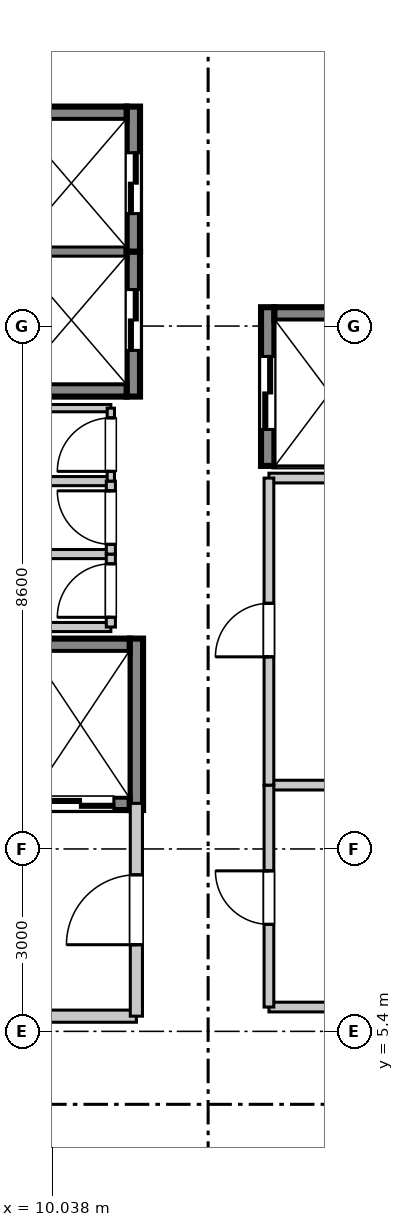
"""IFC4 building model, lengths in metres.
Left out: names, types, materials, properties, quantities, classifications, styles, units other than length and angle.
Written with IfcOpenShell. Run it as: python <this file> out.ifc"""

import sys

from ifc_helpers import new_model, si_unit, direction, frame, frame_2d, origin, place, context, subcontext, project, spatial, rectangle, extrude, source, transform, mapped, element, fill, save


model = new_model("IFC4")
c1 = context("Model", 3, precision=1e-05, world=origin(), true_north=direction((0.0, 1.0)))
c2 = subcontext(c1, "Body", "Model", "MODEL_VIEW")
j1 = project(units=[si_unit("LENGTHUNIT", "METRE"), si_unit("PLANEANGLEUNIT", "RADIAN")], contexts=[c1])
p1 = place(None, origin())
s1 = spatial("IfcSite", under=j1, at=p1, CompositionType="ELEMENT")
p2 = place(p1, origin())
s2 = spatial("IfcBuilding", under=s1, at=p2, CompositionType="ELEMENT")
p3 = place(p2, frame((0.0, 0.0, 352.05)))
s3 = spatial("IfcBuildingStorey", under=s2, at=p3, CompositionType="ELEMENT", Elevation=352.05)
m1 = source(origin(), c2, "Body", "SweptSolid", [
    extrude(rectangle(XDim=2.385, YDim=0.22, at=frame_2d((1.192, 0.0))), origin(), (0.0, 0.0, 1.0), 4.7),
])
p4 = place(p3, frame((11.37, 15.84, 0.0), z_axis=(0.0, 0.0, 1.0), x_axis=(0.0, 1.0, 0.0)))
e1 = element("IfcWall", 1, at=p4, inside=s3, PredefinedType="SHEAR", context=c2, shape_type="MappedRepresentation", body=[
    mapped(m1, transform((0.0, 0.0, 0.0), scale=1.0)),
])
p5 = place(p4, frame((0.76, 0.0, 0.0)))
e2 = element("IfcOpeningElement", 2, at=p5, cuts=e1, PredefinedType="OPENING", context=c2, shape_type="SweptSolid", body=[
    extrude(rectangle(XDim=1.0, YDim=2.2, at=frame_2d((0.5, 1.1))), frame((0.0, 0.12, 0.0), z_axis=(0.0, -1.0, 0.0), x_axis=(1.0, 0.0, 0.0)), (0.0, 0.0, 1.0), 0.24),
])
m2 = source(origin(), c2, "Body", "SweptSolid", [
    extrude(rectangle(XDim=1.82, YDim=0.22, at=frame_2d((0.91, 0.0))), origin(), (0.0, 0.0, 1.0), 4.7),
])
p6 = place(p3, frame((9.44, 15.95, 0.0), z_axis=(0.0, 0.0, 1.0), x_axis=(1.0, 0.0, 0.0)))
e3 = element("IfcWall", 3, at=p6, inside=s3, PredefinedType="SHEAR", context=c2, shape_type="MappedRepresentation", body=[
    mapped(m2, transform((0.0, 0.0, 0.0), scale=1.0)),
])
m3 = source(origin(), c2, "Body", "SweptSolid", [
    extrude(rectangle(XDim=1.82, YDim=0.22, at=frame_2d((0.91, 0.0))), origin(), (0.0, 0.0, 1.0), 5.0),
])
p7 = place(p3, frame((9.44, 18.225, 0.0), z_axis=(0.0, 0.0, 1.0), x_axis=(1.0, 0.0, 0.0)))
e4 = element("IfcWall", 4, at=p7, inside=s3, PredefinedType="SHEAR", context=c2, shape_type="MappedRepresentation", body=[
    mapped(m3, transform((0.0, 0.0, 0.0), scale=1.0)),
])
p8 = place(p3, frame((11.37, 18.225, 0.0), z_axis=(0.0, 0.0, 1.0), x_axis=(0.0, 1.0, 0.0)))
e5 = element("IfcWall", 5, at=p8, inside=s3, PredefinedType="SHEAR", context=c2, shape_type="MappedRepresentation", body=[
    mapped(m1, transform((0.0, 0.0, 0.0), scale=1.0)),
])
p9 = place(p8, frame((0.625, 0.0, 0.0)))
e6 = element("IfcOpeningElement", 6, at=p9, cuts=e5, PredefinedType="OPENING", context=c2, shape_type="SweptSolid", body=[
    extrude(rectangle(XDim=1.0, YDim=2.2, at=frame_2d((0.5, 1.1))), frame((0.0, 0.12, 0.0), z_axis=(0.0, -1.0, 0.0), x_axis=(1.0, 0.0, 0.0)), (0.0, 0.0, 1.0), 0.24),
])
p10 = place(p3, frame((9.44, 20.5, 0.0), z_axis=(0.0, 0.0, 1.0), x_axis=(1.0, 0.0, 0.0)))
e7 = element("IfcWall", 7, at=p10, inside=s3, PredefinedType="SHEAR", context=c2, shape_type="MappedRepresentation", body=[
    mapped(m2, transform((0.0, 0.0, 0.0), scale=1.0)),
])
m4 = source(origin(), c2, "Body", "SweptSolid", [
    extrude(rectangle(XDim=2.82, YDim=0.22, at=frame_2d((1.41, 0.0))), origin(), (0.0, 0.0, 1.0), 4.7),
])
p11 = place(p3, frame((11.42, 9.04, 0.0), z_axis=(0.0, 0.0, 1.0), x_axis=(0.0, 1.0, 0.0)))
e8 = element("IfcWall", 8, at=p11, inside=s3, PredefinedType="SHEAR", context=c2, shape_type="MappedRepresentation", body=[
    mapped(m4, transform((0.0, 0.0, 0.0), scale=1.0)),
])
m5 = source(origin(), c2, "Body", "SweptSolid", [
    extrude(rectangle(XDim=1.62, YDim=0.22, at=frame_2d((0.81, 0.0))), origin(), (0.0, 0.0, 1.0), 4.7),
])
p12 = place(p3, frame((9.69, 9.15, 0.0), z_axis=(0.0, 0.0, 1.0), x_axis=(1.0, 0.0, 0.0)))
e9 = element("IfcWall", 9, at=p12, inside=s3, PredefinedType="SHEAR", context=c2, shape_type="MappedRepresentation", body=[
    mapped(m5, transform((0.0, 0.0, 0.0), scale=1.0)),
])
p13 = place(p12, frame((0.26, 0.0, 0.0)))
e10 = element("IfcOpeningElement", 10, at=p13, cuts=e9, PredefinedType="OPENING", context=c2, shape_type="SweptSolid", body=[
    extrude(rectangle(XDim=1.1, YDim=2.2, at=frame_2d((0.55, 1.1))), frame((0.0, 0.12, 0.0), z_axis=(0.0, -1.0, 0.0), x_axis=(1.0, 0.0, 0.0)), (0.0, 0.0, 1.0), 0.24),
])
p14 = place(p3, frame((9.69, 11.75, 0.0), z_axis=(0.0, 0.0, 1.0), x_axis=(1.0, 0.0, 0.0)))
e11 = element("IfcWall", 11, at=p14, inside=s3, PredefinedType="SHEAR", context=c2, shape_type="MappedRepresentation", body=[
    mapped(m5, transform((0.0, 0.0, 0.0), scale=1.0)),
])
m6 = source(origin(), c2, "Body", "SweptSolid", [
    extrude(rectangle(XDim=2.61, YDim=0.22, at=frame_2d((1.305, 0.0))), origin(), (0.0, 0.0, 1.0), 4.7),
])
p15 = place(p3, frame((13.58, 14.7, 0.0), z_axis=(0.0, 0.0, 1.0), x_axis=(0.0, 1.0, 0.0)))
e12 = element("IfcWall", 12, at=p15, inside=s3, PredefinedType="SHEAR", context=c2, shape_type="MappedRepresentation", body=[
    mapped(m6, transform((0.0, 0.0, 0.0), scale=1.0)),
])
p16 = place(p15, frame((0.6, 0.0, 0.0)))
e13 = element("IfcOpeningElement", 13, at=p16, cuts=e12, PredefinedType="OPENING", context=c2, shape_type="SweptSolid", body=[
    extrude(rectangle(XDim=1.2, YDim=2.2, at=frame_2d((0.6, 1.1))), frame((0.0, 0.12, 0.0), z_axis=(0.0, -1.0, 0.0), x_axis=(1.0, 0.0, 0.0)), (0.0, 0.0, 1.0), 0.24),
])
p17 = place(p3, frame((13.69, 17.2, 0.0), z_axis=(0.0, 0.0, 1.0), x_axis=(1.0, 0.0, 0.0)))
e14 = element("IfcWall", 14, at=p17, inside=s3, PredefinedType="SHEAR", context=c2, shape_type="MappedRepresentation", body=[
    mapped(m2, transform((0.0, 0.0, 0.0), scale=1.0)),
])
m7 = source(origin(), c2, "Body", "SweptSolid", [
    extrude(rectangle(XDim=3.82, YDim=0.2, at=frame_2d((1.91, 0.0))), origin(), (0.0, 0.0, 1.0), 3.4),
])
p18 = place(p3, frame((7.6, 5.65, 0.0), z_axis=(0.0, 0.0, 1.0), x_axis=(1.0, 0.0, 0.0)))
e15 = element("IfcWall", 15, at=p18, inside=s3, PredefinedType="PARTITIONING", context=c2, shape_type="MappedRepresentation", body=[
    mapped(m7, transform((0.0, 0.0, 0.0), scale=1.0)),
])
m8 = source(origin(), c2, "Body", "SweptSolid", [
    extrude(rectangle(XDim=3.5, YDim=0.2, at=frame_2d((1.75, 0.0))), origin(), (0.0, 0.0, 1.0), 3.4),
])
p19 = place(p3, frame((11.42, 5.65, 0.0), z_axis=(0.0, 0.0, 1.0), x_axis=(0.0, 1.0, 0.0)))
e16 = element("IfcWall", 16, at=p19, inside=s3, PredefinedType="PARTITIONING", context=c2, shape_type="MappedRepresentation", body=[
    mapped(m8, transform((0.0, 0.0, 0.0), scale=1.0)),
])
p20 = place(p19, frame((1.175, 0.0, 0.0)))
e17 = element("IfcOpeningElement", 17, at=p20, cuts=e16, PredefinedType="OPENING", context=c2, shape_type="SweptSolid", body=[
    extrude(rectangle(XDim=1.15, YDim=2.15, at=frame_2d((0.575, 1.075))), frame((0.0, 0.11, 0.0), z_axis=(0.0, -1.0, 0.0), x_axis=(1.0, 0.0, 0.0)), (0.0, 0.0, 1.0), 0.22),
])
m9 = source(origin(), c2, "Body", "SweptSolid", [
    extrude(rectangle(XDim=1.75, YDim=0.15, at=frame_2d((0.875, 0.0))), origin(), (0.0, 0.0, 1.0), 3.4),
])
for number, where, z_axis, x_axis in (
    (18, (9.25, 12.05, 0.0), (0.0, 0.0, 1.0), (1.0, 0.0, 0.0)),
    (19, (9.25, 13.25, 0.0), (0.0, 0.0, 1.0), (1.0, 0.0, 0.0)),
):
    element("IfcWall", number, at=place(p3, frame(where, z_axis=z_axis, x_axis=x_axis)), inside=s3, PredefinedType="PARTITIONING", context=c2, shape_type="MappedRepresentation", body=[
        mapped(m9, transform((0.0, 0.0, 0.0), scale=1.0)),
    ])
m10 = source(origin(), c2, "Body", "SweptSolid", [
    extrude(rectangle(XDim=1.2, YDim=0.15, at=frame_2d((0.6, 0.0))), origin(), (0.0, 0.0, 1.0), 3.4),
])
p21 = place(p3, frame((11.0, 12.05, 0.0), z_axis=(0.0, 0.0, 1.0), x_axis=(0.0, 1.0, 0.0)))
e20 = element("IfcWall", 20, at=p21, inside=s3, PredefinedType="PARTITIONING", context=c2, shape_type="MappedRepresentation", body=[
    mapped(m10, transform((0.0, 0.0, 0.0), scale=1.0)),
])
p22 = place(p21, frame((0.16, 0.0, 0.0)))
e21 = element("IfcOpeningElement", 21, at=p22, cuts=e20, PredefinedType="OPENING", context=c2, shape_type="SweptSolid", body=[
    extrude(rectangle(XDim=0.88, YDim=2.1, at=frame_2d((0.44, 1.05))), frame((0.0, 0.085, 0.0), z_axis=(0.0, -1.0, 0.0), x_axis=(1.0, 0.0, 0.0)), (0.0, 0.0, 1.0), 0.17),
])
p23 = place(p3, frame((9.25, 14.45, 0.0), z_axis=(0.0, 0.0, 1.0), x_axis=(1.0, 0.0, 0.0)))
e22 = element("IfcWall", 22, at=p23, inside=s3, PredefinedType="PARTITIONING", context=c2, shape_type="MappedRepresentation", body=[
    mapped(m9, transform((0.0, 0.0, 0.0), scale=1.0)),
])
p24 = place(p3, frame((11.0, 13.25, 0.0), z_axis=(0.0, 0.0, 1.0), x_axis=(0.0, 1.0, 0.0)))
e23 = element("IfcWall", 23, at=p24, inside=s3, PredefinedType="PARTITIONING", context=c2, shape_type="MappedRepresentation", body=[
    mapped(m10, transform((0.0, 0.0, 0.0), scale=1.0)),
])
p25 = place(p24, frame((0.16, 0.0, 0.0)))
e24 = element("IfcOpeningElement", 24, at=p25, cuts=e23, PredefinedType="OPENING", context=c2, shape_type="SweptSolid", body=[
    extrude(rectangle(XDim=0.88, YDim=2.1, at=frame_2d((0.44, 1.05))), frame((0.0, 0.085, 0.0), z_axis=(0.0, -1.0, 0.0), x_axis=(1.0, 0.0, 0.0)), (0.0, 0.0, 1.0), 0.17),
])
m11 = source(origin(), c2, "Body", "SweptSolid", [
    extrude(rectangle(XDim=1.75, YDim=0.12, at=frame_2d((0.875, 0.0))), origin(), (0.0, 0.0, 1.0), 3.4),
])
p26 = place(p3, frame((9.25, 15.65, 0.0), z_axis=(0.0, 0.0, 1.0), x_axis=(1.0, 0.0, 0.0)))
e25 = element("IfcWall", 25, at=p26, inside=s3, PredefinedType="PARTITIONING", context=c2, shape_type="MappedRepresentation", body=[
    mapped(m11, transform((0.0, 0.0, 0.0), scale=1.0)),
])
m12 = source(origin(), c2, "Body", "SweptSolid", [
    extrude(rectangle(XDim=1.2, YDim=0.12, at=frame_2d((0.6, 0.0))), origin(), (0.0, 0.0, 1.0), 3.4),
])
p27 = place(p3, frame((11.0, 14.45, 0.0), z_axis=(0.0, 0.0, 1.0), x_axis=(0.0, 1.0, 0.0)))
e26 = element("IfcWall", 26, at=p27, inside=s3, PredefinedType="PARTITIONING", context=c2, shape_type="MappedRepresentation", body=[
    mapped(m12, transform((0.0, 0.0, 0.0), scale=1.0)),
])
p28 = place(p27, frame((0.16, 0.0, 0.0)))
e27 = element("IfcOpeningElement", 27, at=p28, cuts=e26, PredefinedType="OPENING", context=c2, shape_type="SweptSolid", body=[
    extrude(rectangle(XDim=0.88, YDim=2.1, at=frame_2d((0.44, 1.05))), frame((0.0, 0.07, 0.0), z_axis=(0.0, -1.0, 0.0), x_axis=(1.0, 0.0, 0.0)), (0.0, 0.0, 1.0), 0.14),
])
m13 = source(origin(), c2, "Body", "SweptSolid", [
    extrude(rectangle(XDim=2.05, YDim=0.16, at=frame_2d((1.025, 0.0))), origin(), (0.0, 0.0, 1.0), 3.4),
])
for number, where, z_axis, x_axis in (
    (28, (13.6, 5.8, 0.0), (0.0, 0.0, 1.0), (1.0, 0.0, 0.0)),
    (29, (13.6, 9.45, 0.0), (0.0, 0.0, 1.0), (1.0, 0.0, 0.0)),
):
    element("IfcWall", number, at=place(p3, frame(where, z_axis=z_axis, x_axis=x_axis)), inside=s3, PredefinedType="PARTITIONING", context=c2, shape_type="MappedRepresentation", body=[
        mapped(m13, transform((0.0, 0.0, 0.0), scale=1.0)),
    ])
m14 = source(origin(), c2, "Body", "SweptSolid", [
    extrude(rectangle(XDim=3.65, YDim=0.16, at=frame_2d((1.825, 0.0))), origin(), (0.0, 0.0, 1.0), 3.4),
])
p29 = place(p3, frame((13.6, 5.8, 0.0), z_axis=(0.0, 0.0, 1.0), x_axis=(0.0, 1.0, 0.0)))
e30 = element("IfcWall", 30, at=p29, inside=s3, PredefinedType="PARTITIONING", context=c2, shape_type="MappedRepresentation", body=[
    mapped(m14, transform((0.0, 0.0, 0.0), scale=1.0)),
])
p30 = place(p29, frame((1.36, 0.0, 0.0)))
e31 = element("IfcOpeningElement", 31, at=p30, cuts=e30, PredefinedType="OPENING", context=c2, shape_type="SweptSolid", body=[
    extrude(rectangle(XDim=0.88, YDim=2.1, at=frame_2d((0.44, 1.05))), frame((0.0, 0.09, 0.0), z_axis=(0.0, -1.0, 0.0), x_axis=(1.0, 0.0, 0.0)), (0.0, 0.0, 1.0), 0.18),
])
p31 = place(p3, frame((13.6, 14.5, 0.0), z_axis=(0.0, 0.0, 1.0), x_axis=(1.0, 0.0, 0.0)))
e32 = element("IfcWall", 32, at=p31, inside=s3, PredefinedType="PARTITIONING", context=c2, shape_type="MappedRepresentation", body=[
    mapped(m13, transform((0.0, 0.0, 0.0), scale=1.0)),
])
m15 = source(origin(), c2, "Body", "SweptSolid", [
    extrude(rectangle(XDim=5.05, YDim=0.16, at=frame_2d((2.525, 0.0))), origin(), (0.0, 0.0, 1.0), 3.4),
])
p32 = place(p3, frame((13.6, 9.45, 0.0), z_axis=(0.0, 0.0, 1.0), x_axis=(0.0, 1.0, 0.0)))
e33 = element("IfcWall", 33, at=p32, inside=s3, PredefinedType="PARTITIONING", context=c2, shape_type="MappedRepresentation", body=[
    mapped(m15, transform((0.0, 0.0, 0.0), scale=1.0)),
])
p33 = place(p32, frame((2.11, 0.0, 0.0)))
e34 = element("IfcOpeningElement", 34, at=p33, cuts=e33, PredefinedType="OPENING", context=c2, shape_type="SweptSolid", body=[
    extrude(rectangle(XDim=0.88, YDim=2.1, at=frame_2d((0.44, 1.05))), frame((0.0, 0.09, 0.0), z_axis=(0.0, -1.0, 0.0), x_axis=(1.0, 0.0, 0.0)), (0.0, 0.0, 1.0), 0.18),
])
m16 = source(origin(), c2, "Body", "SweptSolid", [
    extrude(rectangle(XDim=1.0, YDim=2.2, at=frame_2d((0.5, 1.1))), frame((0.0, 0.025, 0.0), z_axis=(0.0, -1.0, 0.0), x_axis=(1.0, 0.0, 0.0)), (0.0, 0.0, 1.0), 0.05),
])
p34 = place(p5, frame((1.0, 0.0, 0.0), z_axis=(0.0, 0.0, 1.0), x_axis=(-1.0, 0.0, 0.0)))
e35 = element("IfcDoor", 35, at=p34, inside=s3, OperationType="DOUBLE_DOOR_SLIDING", PredefinedType="DOOR", context=c2, shape_type="MappedRepresentation", body=[
    mapped(m16, transform((0.0, 0.0, 0.0), scale=1.0)),
])
fill(e2, e35)
p35 = place(p9, frame((1.0, 0.0, 0.0), z_axis=(0.0, 0.0, 1.0), x_axis=(-1.0, 0.0, 0.0)))
e36 = element("IfcDoor", 36, at=p35, inside=s3, OperationType="DOUBLE_DOOR_SLIDING", PredefinedType="DOOR", context=c2, shape_type="MappedRepresentation", body=[
    mapped(m16, transform((0.0, 0.0, 0.0), scale=1.0)),
])
fill(e6, e36)
m17 = source(origin(), c2, "Body", "SweptSolid", [
    extrude(rectangle(XDim=1.1, YDim=2.2, at=frame_2d((0.55, 1.1))), frame((0.0, 0.025, 0.0), z_axis=(0.0, -1.0, 0.0), x_axis=(1.0, 0.0, 0.0)), (0.0, 0.0, 1.0), 0.05),
])
p36 = place(p13, frame((1.1, 0.0, 0.0), z_axis=(0.0, 0.0, 1.0), x_axis=(-1.0, 0.0, 0.0)))
e37 = element("IfcDoor", 37, at=p36, inside=s3, OperationType="DOUBLE_DOOR_SLIDING", PredefinedType="DOOR", context=c2, shape_type="MappedRepresentation", body=[
    mapped(m17, transform((0.0, 0.0, 0.0), scale=1.0)),
])
fill(e10, e37)
m18 = source(origin(), c2, "Body", "SweptSolid", [
    extrude(rectangle(XDim=1.2, YDim=2.2, at=frame_2d((0.6, 1.1))), frame((0.0, 0.025, 0.0), z_axis=(0.0, -1.0, 0.0), x_axis=(1.0, 0.0, 0.0)), (0.0, 0.0, 1.0), 0.05),
])
p37 = place(p16, origin())
e38 = element("IfcDoor", 38, at=p37, inside=s3, OperationType="DOUBLE_DOOR_SLIDING", PredefinedType="DOOR", context=c2, shape_type="MappedRepresentation", body=[
    mapped(m18, transform((0.0, 0.0, 0.0), scale=1.0)),
])
fill(e13, e38)
m19 = source(origin(), c2, "Body", "SweptSolid", [
    extrude(rectangle(XDim=1.15, YDim=2.15, at=frame_2d((0.575, 1.075))), frame((0.0, 0.025, 0.0), z_axis=(0.0, -1.0, 0.0), x_axis=(1.0, 0.0, 0.0)), (0.0, 0.0, 1.0), 0.05),
])
p38 = place(p20, frame((1.15, 0.0, 0.0), z_axis=(0.0, 0.0, 1.0), x_axis=(-1.0, 0.0, 0.0)))
e39 = element("IfcDoor", 39, at=p38, inside=s3, OperationType="SINGLE_SWING_LEFT", PredefinedType="DOOR", context=c2, shape_type="MappedRepresentation", body=[
    mapped(m19, transform((0.0, 0.0, 0.0), scale=1.0)),
])
fill(e17, e39)
m20 = source(origin(), c2, "Body", "SweptSolid", [
    extrude(rectangle(XDim=0.88, YDim=2.1, at=frame_2d((0.44, 1.05))), frame((0.0, 0.025, 0.0), z_axis=(0.0, -1.0, 0.0), x_axis=(1.0, 0.0, 0.0)), (0.0, 0.0, 1.0), 0.05),
])
p39 = place(p22, origin())
e40 = element("IfcDoor", 40, at=p39, inside=s3, OperationType="SINGLE_SWING_LEFT", PredefinedType="DOOR", context=c2, shape_type="MappedRepresentation", body=[
    mapped(m20, transform((0.0, 0.0, 0.0), scale=1.0)),
])
fill(e21, e40)
p40 = place(p25, origin())
e41 = element("IfcDoor", 41, at=p40, inside=s3, OperationType="SINGLE_SWING_RIGHT", PredefinedType="DOOR", context=c2, shape_type="MappedRepresentation", body=[
    mapped(m20, transform((0.0, 0.0, 0.0), scale=1.0)),
])
fill(e24, e41)
p41 = place(p28, origin())
e42 = element("IfcDoor", 42, at=p41, inside=s3, OperationType="SINGLE_SWING_LEFT", PredefinedType="DOOR", context=c2, shape_type="MappedRepresentation", body=[
    mapped(m20, transform((0.0, 0.0, 0.0), scale=1.0)),
])
fill(e27, e42)
p42 = place(p30, frame((0.88, 0.0, 0.0), z_axis=(0.0, 0.0, 1.0), x_axis=(-1.0, 0.0, 0.0)))
e43 = element("IfcDoor", 43, at=p42, inside=s3, OperationType="SINGLE_SWING_RIGHT", PredefinedType="DOOR", context=c2, shape_type="MappedRepresentation", body=[
    mapped(m20, transform((0.0, 0.0, 0.0), scale=1.0)),
])
fill(e31, e43)
p43 = place(p33, frame((0.88, 0.0, 0.0), z_axis=(0.0, 0.0, 1.0), x_axis=(-1.0, 0.0, 0.0)))
e44 = element("IfcDoor", 44, at=p43, inside=s3, OperationType="SINGLE_SWING_LEFT", PredefinedType="DOOR", context=c2, shape_type="MappedRepresentation", body=[
    mapped(m20, transform((0.0, 0.0, 0.0), scale=1.0)),
])
fill(e34, e44)
save(model, sys.argv[1])
